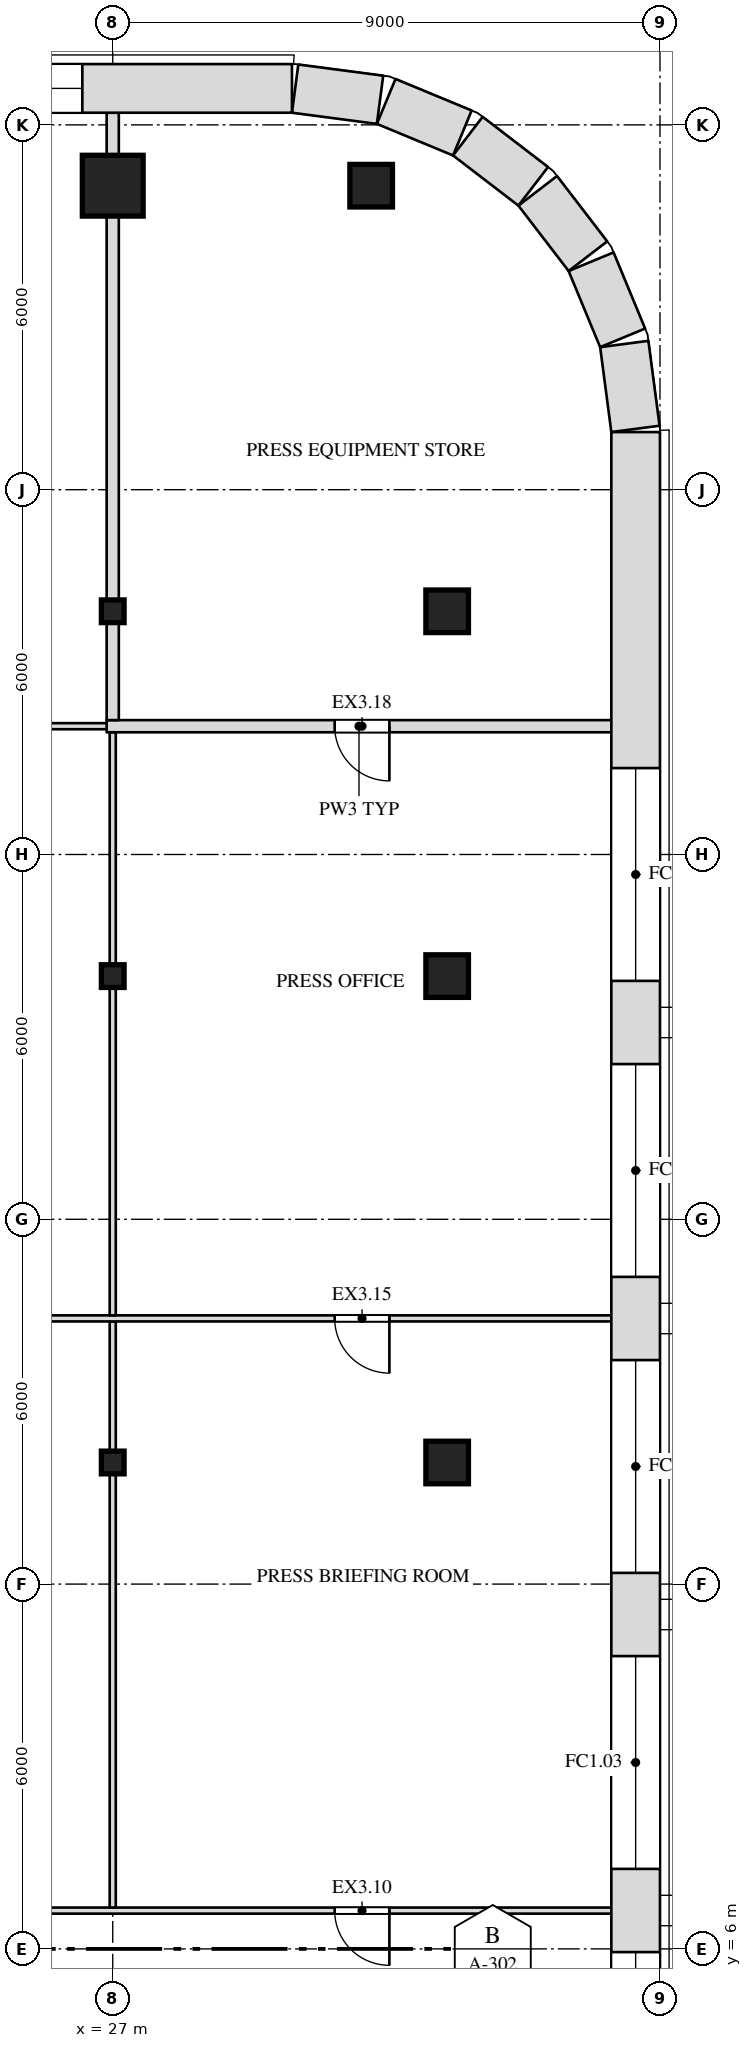
"""IFC4 building model, lengths in metres.
Left out: names, types, materials, properties, quantities, classifications, styles, units other than length and angle.
Written with IfcOpenShell. Run it as: python <this file> out.ifc"""

import sys

from ifc_helpers import new_model, si_unit, direction, frame, frame_2d, origin, origin_2d, place, context, subcontext, project, spatial, rectangle, i_section, extrude, element, fill, save


model = new_model("IFC4")
c1 = context("Model", 3, precision=1e-05, world=origin(), true_north=direction((0.0, 1.0)))
c2 = subcontext(c1, "Body", "Model", "MODEL_VIEW")
j1 = project(units=[si_unit("LENGTHUNIT", "METRE"), si_unit("PLANEANGLEUNIT", "RADIAN")], contexts=[c1])
p1 = place(None, origin())
s1 = spatial("IfcSite", under=j1, at=p1, CompositionType="ELEMENT")
p2 = place(p1, origin())
s2 = spatial("IfcBuilding", under=s1, at=p2, CompositionType="ELEMENT")
p3 = place(p2, frame((0.0, 0.0, 280.5)))
s3 = spatial("IfcBuildingStorey", under=s2, at=p3, CompositionType="ELEMENT", Elevation=280.5)
p4 = place(p3, frame((27.0, 14.0, 0.0), z_axis=(0.0, 0.0, 1.0), x_axis=(1.0, 0.0, 0.0)))
e1 = element("IfcColumn", 1, at=p4, inside=s3, PredefinedType="COLUMN", context=c2, shape_type="SweptSolid", body=[
    extrude(i_section(OverallWidth=0.373, OverallDepth=0.373, WebThickness=0.016, FlangeThickness=0.026, at=origin_2d()), origin(), (0.0, 0.0, 1.0), 4.0),
])
p5 = place(p3, frame((32.5, 14.0, 0.0), z_axis=(0.0, 0.0, 1.0), x_axis=(1.0, 0.0, 0.0)))
e2 = element("IfcColumn", 2, at=p5, inside=s3, PredefinedType="COLUMN", context=c2, shape_type="SweptSolid", body=[
    extrude(rectangle(XDim=0.7, YDim=0.7, at=origin_2d()), origin(), (0.0, 0.0, 1.0), 4.0),
])
p6 = place(p3, frame((27.0, 22.0, 0.0), z_axis=(0.0, 0.0, 1.0), x_axis=(1.0, 0.0, 0.0)))
e3 = element("IfcColumn", 3, at=p6, inside=s3, PredefinedType="COLUMN", context=c2, shape_type="SweptSolid", body=[
    extrude(i_section(OverallWidth=0.373, OverallDepth=0.373, WebThickness=0.016, FlangeThickness=0.026, at=origin_2d()), origin(), (0.0, 0.0, 1.0), 4.0),
])
p7 = place(p3, frame((32.5, 22.0, 0.0), z_axis=(0.0, 0.0, 1.0), x_axis=(1.0, 0.0, 0.0)))
e4 = element("IfcColumn", 4, at=p7, inside=s3, PredefinedType="COLUMN", context=c2, shape_type="SweptSolid", body=[
    extrude(rectangle(XDim=0.7, YDim=0.7, at=origin_2d()), origin(), (0.0, 0.0, 1.0), 4.0),
])
p8 = place(p3, frame((27.0, 28.0, 0.0), z_axis=(0.0, 0.0, 1.0), x_axis=(1.0, 0.0, 0.0)))
e5 = element("IfcColumn", 5, at=p8, inside=s3, PredefinedType="COLUMN", context=c2, shape_type="SweptSolid", body=[
    extrude(i_section(OverallWidth=0.373, OverallDepth=0.373, WebThickness=0.016, FlangeThickness=0.026, at=origin_2d()), origin(), (0.0, 0.0, 1.0), 4.0),
])
p9 = place(p3, frame((32.5, 28.0, 0.0), z_axis=(0.0, 0.0, 1.0), x_axis=(1.0, 0.0, 0.0)))
e6 = element("IfcColumn", 6, at=p9, inside=s3, PredefinedType="COLUMN", context=c2, shape_type="SweptSolid", body=[
    extrude(rectangle(XDim=0.7, YDim=0.7, at=origin_2d()), origin(), (0.0, 0.0, 1.0), 4.0),
])
p10 = place(p3, frame((27.0, 35.0, 0.0), z_axis=(0.0, 0.0, 1.0), x_axis=(1.0, 0.0, 0.0)))
e7 = element("IfcColumn", 7, at=p10, inside=s3, PredefinedType="COLUMN", context=c2, shape_type="SweptSolid", body=[
    extrude(rectangle(XDim=1.0, YDim=1.0, at=origin_2d()), origin(), (0.0, 0.0, 1.0), 4.0),
])
p11 = place(p3, frame((31.25, 35.0, 0.0), z_axis=(0.0, 0.0, 1.0), x_axis=(1.0, 0.0, 0.0)))
e8 = element("IfcColumn", 8, at=p11, inside=s3, PredefinedType="COLUMN", context=c2, shape_type="SweptSolid", body=[
    extrude(rectangle(XDim=0.7, YDim=0.7, at=origin_2d()), origin(), (0.0, 0.0, 1.0), 4.0),
])
p12 = place(p3, frame((15.05, 6.63, 0.0), z_axis=(0.0, 0.0, 1.0), x_axis=(1.0, 0.0, 0.0)))
e9 = element("IfcWall", 9, at=p12, inside=s3, PredefinedType="PARTITIONING", context=c2, shape_type="SweptSolid", body=[
    extrude(rectangle(XDim=20.15, YDim=0.1, at=frame_2d((10.075, 0.0))), origin(), (0.0, 0.0, 1.0), 3.78),
])
p13 = place(p12, frame((15.6, 0.0, 0.0)))
e10 = element("IfcOpeningElement", 10, at=p13, cuts=e9, PredefinedType="OPENING", context=c2, shape_type="SweptSolid", body=[
    extrude(rectangle(XDim=0.9, YDim=2.1, at=frame_2d((0.45, 1.05))), frame((0.0, 0.062, 0.0), z_axis=(0.0, -1.0, 0.0), x_axis=(1.0, 0.0, 0.0)), (0.0, 0.0, 1.0), 0.124),
])
p14 = place(p3, frame((27.0, 6.68, 0.0), z_axis=(0.0, 0.0, 1.0), x_axis=(0.0, 1.0, 0.0)))
e11 = element("IfcWall", 11, at=p14, inside=s3, PredefinedType="PARTITIONING", context=c2, shape_type="SweptSolid", body=[
    extrude(rectangle(XDim=7.133, YDim=0.1, at=frame_2d((3.567, 0.0))), origin(), (0.0, 0.0, 1.0), 2.848),
])
p15 = place(p3, frame((27.0, 14.187, 0.0), z_axis=(0.0, 0.0, 1.0), x_axis=(0.0, 1.0, 0.0)))
e12 = element("IfcWall", 12, at=p15, inside=s3, PredefinedType="PARTITIONING", context=c2, shape_type="SweptSolid", body=[
    extrude(rectangle(XDim=2.133, YDim=0.1, at=frame_2d((1.067, 0.0))), origin(), (0.0, 0.0, 1.0), 2.848),
])
p16 = place(p3, frame((15.05, 16.37, 0.0), z_axis=(0.0, 0.0, 1.0), x_axis=(1.0, 0.0, 0.0)))
e13 = element("IfcWall", 13, at=p16, inside=s3, PredefinedType="PARTITIONING", context=c2, shape_type="SweptSolid", body=[
    extrude(rectangle(XDim=20.15, YDim=0.1, at=frame_2d((10.075, 0.0))), origin(), (0.0, 0.0, 1.0), 3.78),
])
p17 = place(p16, frame((15.6, 0.0, 0.0)))
e14 = element("IfcOpeningElement", 14, at=p17, cuts=e13, PredefinedType="OPENING", context=c2, shape_type="SweptSolid", body=[
    extrude(rectangle(XDim=0.9, YDim=2.1, at=frame_2d((0.45, 1.05))), frame((0.0, 0.062, 0.0), z_axis=(0.0, -1.0, 0.0), x_axis=(1.0, 0.0, 0.0)), (0.0, 0.0, 1.0), 0.124),
])
p18 = place(p3, frame((27.0, 16.42, 0.0), z_axis=(0.0, 0.0, 1.0), x_axis=(0.0, 1.0, 0.0)))
e15 = element("IfcWall", 15, at=p18, inside=s3, PredefinedType="PARTITIONING", context=c2, shape_type="SweptSolid", body=[
    extrude(rectangle(XDim=5.393, YDim=0.1, at=frame_2d((2.697, 0.0))), origin(), (0.0, 0.0, 1.0), 2.848),
])
p19 = place(p3, frame((27.0, 22.187, 0.0), z_axis=(0.0, 0.0, 1.0), x_axis=(0.0, 1.0, 0.0)))
e16 = element("IfcWall", 16, at=p19, inside=s3, PredefinedType="PARTITIONING", context=c2, shape_type="SweptSolid", body=[
    extrude(rectangle(XDim=3.823, YDim=0.1, at=frame_2d((1.912, 0.0))), origin(), (0.0, 0.0, 1.0), 2.848),
])
p20 = place(p3, frame((15.05, 26.11, 0.0), z_axis=(0.0, 0.0, 1.0), x_axis=(1.0, 0.0, 0.0)))
e17 = element("IfcWall", 17, at=p20, inside=s3, PredefinedType="PARTITIONING", context=c2, shape_type="SweptSolid", body=[
    extrude(rectangle(XDim=12.05, YDim=0.1, at=frame_2d((6.025, 0.0))), origin(), (0.0, 0.0, 1.0), 3.78),
])
p21 = place(p3, frame((26.9, 26.11, 0.0), z_axis=(0.0, 0.0, 1.0), x_axis=(1.0, 0.0, 0.0)))
e18 = element("IfcWall", 18, at=p21, inside=s3, PredefinedType="PARTITIONING", context=c2, shape_type="SweptSolid", body=[
    extrude(rectangle(XDim=8.3, YDim=0.2, at=frame_2d((4.15, 0.0))), origin(), (0.0, 0.0, 1.0), 3.78),
])
p22 = place(p21, frame((3.75, 0.0, 0.0)))
e19 = element("IfcOpeningElement", 19, at=p22, cuts=e18, PredefinedType="OPENING", context=c2, shape_type="SweptSolid", body=[
    extrude(rectangle(XDim=0.9, YDim=2.1, at=frame_2d((0.45, 1.05))), frame((0.0, 0.112, 0.0), z_axis=(0.0, -1.0, 0.0), x_axis=(1.0, 0.0, 0.0)), (0.0, 0.0, 1.0), 0.224),
])
p23 = place(p3, frame((27.0, 26.21, 0.0), z_axis=(0.0, 0.0, 1.0), x_axis=(0.0, 1.0, 0.0)))
e20 = element("IfcWall", 20, at=p23, inside=s3, PredefinedType="PARTITIONING", context=c2, shape_type="SweptSolid", body=[
    extrude(rectangle(XDim=1.603, YDim=0.2, at=frame_2d((0.802, 0.0))), origin(), (0.0, 0.0, 1.0), 2.848),
])
p24 = place(p3, frame((27.0, 28.187, 0.0), z_axis=(0.0, 0.0, 1.0), x_axis=(0.0, 1.0, 0.0)))
e21 = element("IfcWall", 21, at=p24, inside=s3, PredefinedType="PARTITIONING", context=c2, shape_type="SweptSolid", body=[
    extrude(rectangle(XDim=6.313, YDim=0.2, at=frame_2d((3.157, 0.0))), origin(), (0.0, 0.0, 1.0), 2.848),
])
p25 = place(p3, frame((27.0, 35.5, 0.0), z_axis=(0.0, 0.0, 1.0), x_axis=(0.0, 1.0, 0.0)))
e22 = element("IfcWall", 22, at=p25, inside=s3, PredefinedType="PARTITIONING", context=c2, shape_type="SweptSolid", body=[
    extrude(rectangle(XDim=0.7, YDim=0.2, at=frame_2d((0.35, 0.0))), origin(), (0.0, 0.0, 1.0), 3.78),
])
p26 = place(p3, frame((35.6, -7.948, 0.0), z_axis=(0.0, 0.0, 1.0), x_axis=(0.0, 1.0, 0.0)))
e23 = element("IfcWall", 23, at=p26, inside=s3, PredefinedType="SOLIDWALL", context=c2, shape_type="SweptSolid", body=[
    extrude(rectangle(XDim=38.895, YDim=0.8, at=frame_2d((19.448, 0.0))), origin(), (0.0, 0.0, 1.0), 3.78),
])
p27 = place(p26, frame((5.526, 0.0, 1.0)))
e24 = element("IfcOpeningElement", 24, at=p27, cuts=e23, PredefinedType="OPENING", context=c2, shape_type="SweptSolid", body=[
    extrude(rectangle(XDim=3.5, YDim=2.5, at=frame_2d((1.75, 1.25))), frame((0.0, 0.412, 0.0), z_axis=(0.0, -1.0, 0.0), x_axis=(1.0, 0.0, 0.0)), (0.0, 0.0, 1.0), 0.824),
])
p28 = place(p26, frame((10.395, 0.0, 1.0)))
e25 = element("IfcOpeningElement", 25, at=p28, cuts=e23, PredefinedType="OPENING", context=c2, shape_type="SweptSolid", body=[
    extrude(rectangle(XDim=3.5, YDim=2.5, at=frame_2d((1.75, 1.25))), frame((0.0, 0.412, 0.0), z_axis=(0.0, -1.0, 0.0), x_axis=(1.0, 0.0, 0.0)), (0.0, 0.0, 1.0), 0.824),
])
p29 = place(p26, frame((15.263, 0.0, 1.0)))
e26 = element("IfcOpeningElement", 26, at=p29, cuts=e23, PredefinedType="OPENING", context=c2, shape_type="SweptSolid", body=[
    extrude(rectangle(XDim=3.5, YDim=2.5, at=frame_2d((1.75, 1.25))), frame((0.0, 0.412, 0.0), z_axis=(0.0, -1.0, 0.0), x_axis=(1.0, 0.0, 0.0)), (0.0, 0.0, 1.0), 0.824),
])
p30 = place(p26, frame((20.132, 0.0, 1.0)))
e27 = element("IfcOpeningElement", 27, at=p30, cuts=e23, PredefinedType="OPENING", context=c2, shape_type="SweptSolid", body=[
    extrude(rectangle(XDim=3.5, YDim=2.5, at=frame_2d((1.75, 1.25))), frame((0.0, 0.412, 0.0), z_axis=(0.0, -1.0, 0.0), x_axis=(1.0, 0.0, 0.0)), (0.0, 0.0, 1.0), 0.824),
])
p31 = place(p26, frame((25.0, 0.0, 1.0)))
e28 = element("IfcOpeningElement", 28, at=p31, cuts=e23, PredefinedType="OPENING", context=c2, shape_type="SweptSolid", body=[
    extrude(rectangle(XDim=3.5, YDim=2.5, at=frame_2d((1.75, 1.25))), frame((0.0, 0.412, 0.0), z_axis=(0.0, -1.0, 0.0), x_axis=(1.0, 0.0, 0.0)), (0.0, 0.0, 1.0), 0.824),
])
p32 = place(p26, frame((29.869, 0.0, 1.0)))
e29 = element("IfcOpeningElement", 29, at=p32, cuts=e23, PredefinedType="OPENING", context=c2, shape_type="SweptSolid", body=[
    extrude(rectangle(XDim=3.5, YDim=2.5, at=frame_2d((1.75, 1.25))), frame((0.0, 0.412, 0.0), z_axis=(0.0, -1.0, 0.0), x_axis=(1.0, 0.0, 0.0)), (0.0, 0.0, 1.0), 0.824),
])
p33 = place(p3, frame((35.597, 31.0, 0.0), z_axis=(0.0, 0.0, 1.0), x_axis=(-0.130517283865, 0.99144603414, 0.0)))
e30 = element("IfcWall", 30, at=p33, inside=s3, PredefinedType="SOLIDWALL", context=c2, shape_type="SweptSolid", body=[
    extrude(rectangle(XDim=1.408, YDim=0.8, at=frame_2d((0.704, 0.0))), origin(), (0.0, 0.0, 1.0), 3.78),
])
p34 = place(p3, frame((35.386, 32.497, 0.0), z_axis=(0.0, 0.0, 1.0), x_axis=(-0.38276009378, 0.923847774587, 0.0)))
e31 = element("IfcWall", 31, at=p34, inside=s3, PredefinedType="SOLIDWALL", context=c2, shape_type="SweptSolid", body=[
    extrude(rectangle(XDim=1.355, YDim=0.8, at=frame_2d((0.678, 0.0))), origin(), (0.0, 0.0, 1.0), 3.78),
])
for number, where, z_axis, x_axis in (
    (32, (34.815, 33.84, 0.0), (0.0, 0.0, 1.0), (-0.609, 0.793, 0.0)),
    (33, (33.916, 34.989, 0.0), (0.0, 0.0, 1.0), (-0.793, 0.609, 0.0)),
):
    element("IfcWall", number, at=place(p3, frame(where, z_axis=z_axis, x_axis=x_axis)), inside=s3, PredefinedType="SOLIDWALL", context=c2, shape_type="SweptSolid", body=[
        extrude(rectangle(XDim=1.356, YDim=0.8, at=frame_2d((0.678, 0.0))), origin(), (0.0, 0.0, 1.0), 3.78),
    ])
p35 = place(p3, frame((32.75, 35.867, 0.0), z_axis=(0.0, 0.0, 1.0), x_axis=(-0.923847774587, 0.38276009378, 0.0)))
e34 = element("IfcWall", 34, at=p35, inside=s3, PredefinedType="SOLIDWALL", context=c2, shape_type="SweptSolid", body=[
    extrude(rectangle(XDim=1.355, YDim=0.8, at=frame_2d((0.678, 0.0))), origin(), (0.0, 0.0, 1.0), 3.78),
])
p36 = place(p3, frame((31.396, 36.413, 0.0), z_axis=(0.0, 0.0, 1.0), x_axis=(-0.99144603414, 0.130517283865, 0.0)))
e35 = element("IfcWall", 35, at=p36, inside=s3, PredefinedType="SOLIDWALL", context=c2, shape_type="SweptSolid", body=[
    extrude(rectangle(XDim=1.408, YDim=0.8, at=frame_2d((0.704, 0.0))), origin(), (0.0, 0.0, 1.0), 3.78),
])
p37 = place(p3, frame((29.948, 36.6, 0.0), z_axis=(0.0, 0.0, 1.0), x_axis=(-1.0, 0.0, 0.0)))
e36 = element("IfcWall", 36, at=p37, inside=s3, PredefinedType="SOLIDWALL", context=c2, shape_type="SweptSolid", body=[
    extrude(rectangle(XDim=59.895, YDim=0.8, at=frame_2d((29.948, 0.0))), origin(), (0.0, 0.0, 1.0), 3.78),
])
p38 = place(p37, frame((3.448, 0.0, 1.0)))
e37 = element("IfcOpeningElement", 37, at=p38, cuts=e36, PredefinedType="OPENING", context=c2, shape_type="SweptSolid", body=[
    extrude(rectangle(XDim=3.5, YDim=2.5, at=frame_2d((1.75, 1.25))), frame((0.0, 0.412, 0.0), z_axis=(0.0, -1.0, 0.0), x_axis=(1.0, 0.0, 0.0)), (0.0, 0.0, 1.0), 0.824),
])
p39 = place(p37, frame((7.948, 0.0, 1.0)))
e38 = element("IfcOpeningElement", 38, at=p39, cuts=e36, PredefinedType="OPENING", context=c2, shape_type="SweptSolid", body=[
    extrude(rectangle(XDim=3.5, YDim=2.5, at=frame_2d((1.75, 1.25))), frame((0.0, 0.412, 0.0), z_axis=(0.0, -1.0, 0.0), x_axis=(1.0, 0.0, 0.0)), (0.0, 0.0, 1.0), 0.824),
])
p40 = place(p37, frame((12.448, 0.0, 1.0)))
e39 = element("IfcOpeningElement", 39, at=p40, cuts=e36, PredefinedType="OPENING", context=c2, shape_type="SweptSolid", body=[
    extrude(rectangle(XDim=3.5, YDim=2.5, at=frame_2d((1.75, 1.25))), frame((0.0, 0.412, 0.0), z_axis=(0.0, -1.0, 0.0), x_axis=(1.0, 0.0, 0.0)), (0.0, 0.0, 1.0), 0.824),
])
p41 = place(p37, frame((16.948, 0.0, 1.0)))
e40 = element("IfcOpeningElement", 40, at=p41, cuts=e36, PredefinedType="OPENING", context=c2, shape_type="SweptSolid", body=[
    extrude(rectangle(XDim=3.5, YDim=2.5, at=frame_2d((1.75, 1.25))), frame((0.0, 0.412, 0.0), z_axis=(0.0, -1.0, 0.0), x_axis=(1.0, 0.0, 0.0)), (0.0, 0.0, 1.0), 0.824),
])
p42 = place(p37, frame((21.448, 0.0, 1.0)))
e41 = element("IfcOpeningElement", 41, at=p42, cuts=e36, PredefinedType="OPENING", context=c2, shape_type="SweptSolid", body=[
    extrude(rectangle(XDim=3.5, YDim=2.5, at=frame_2d((1.75, 1.25))), frame((0.0, 0.412, 0.0), z_axis=(0.0, -1.0, 0.0), x_axis=(1.0, 0.0, 0.0)), (0.0, 0.0, 1.0), 0.824),
])
p43 = place(p37, frame((25.948, 0.0, 1.0)))
e42 = element("IfcOpeningElement", 42, at=p43, cuts=e36, PredefinedType="OPENING", context=c2, shape_type="SweptSolid", body=[
    extrude(rectangle(XDim=3.5, YDim=2.5, at=frame_2d((1.75, 1.25))), frame((0.0, 0.412, 0.0), z_axis=(0.0, -1.0, 0.0), x_axis=(1.0, 0.0, 0.0)), (0.0, 0.0, 1.0), 0.824),
])
p44 = place(p37, frame((30.448, 0.0, 1.0)))
e43 = element("IfcOpeningElement", 43, at=p44, cuts=e36, PredefinedType="OPENING", context=c2, shape_type="SweptSolid", body=[
    extrude(rectangle(XDim=3.5, YDim=2.5, at=frame_2d((1.75, 1.25))), frame((0.0, 0.412, 0.0), z_axis=(0.0, -1.0, 0.0), x_axis=(1.0, 0.0, 0.0)), (0.0, 0.0, 1.0), 0.824),
])
p45 = place(p37, frame((34.948, 0.0, 1.0)))
e44 = element("IfcOpeningElement", 44, at=p45, cuts=e36, PredefinedType="OPENING", context=c2, shape_type="SweptSolid", body=[
    extrude(rectangle(XDim=3.5, YDim=2.5, at=frame_2d((1.75, 1.25))), frame((0.0, 0.412, 0.0), z_axis=(0.0, -1.0, 0.0), x_axis=(1.0, 0.0, 0.0)), (0.0, 0.0, 1.0), 0.824),
])
p46 = place(p37, frame((39.448, 0.0, 1.0)))
e45 = element("IfcOpeningElement", 45, at=p46, cuts=e36, PredefinedType="OPENING", context=c2, shape_type="SweptSolid", body=[
    extrude(rectangle(XDim=3.5, YDim=2.5, at=frame_2d((1.75, 1.25))), frame((0.0, 0.412, 0.0), z_axis=(0.0, -1.0, 0.0), x_axis=(1.0, 0.0, 0.0)), (0.0, 0.0, 1.0), 0.824),
])
p47 = place(p37, frame((43.948, 0.0, 1.0)))
e46 = element("IfcOpeningElement", 46, at=p47, cuts=e36, PredefinedType="OPENING", context=c2, shape_type="SweptSolid", body=[
    extrude(rectangle(XDim=3.5, YDim=2.5, at=frame_2d((1.75, 1.25))), frame((0.0, 0.412, 0.0), z_axis=(0.0, -1.0, 0.0), x_axis=(1.0, 0.0, 0.0)), (0.0, 0.0, 1.0), 0.824),
])
p48 = place(p37, frame((48.448, 0.0, 1.0)))
e47 = element("IfcOpeningElement", 47, at=p48, cuts=e36, PredefinedType="OPENING", context=c2, shape_type="SweptSolid", body=[
    extrude(rectangle(XDim=3.5, YDim=2.5, at=frame_2d((1.75, 1.25))), frame((0.0, 0.412, 0.0), z_axis=(0.0, -1.0, 0.0), x_axis=(1.0, 0.0, 0.0)), (0.0, 0.0, 1.0), 0.824),
])
p49 = place(p37, frame((52.948, 0.0, 1.0)))
e48 = element("IfcOpeningElement", 48, at=p49, cuts=e36, PredefinedType="OPENING", context=c2, shape_type="SweptSolid", body=[
    extrude(rectangle(XDim=3.5, YDim=2.5, at=frame_2d((1.75, 1.25))), frame((0.0, 0.412, 0.0), z_axis=(0.0, -1.0, 0.0), x_axis=(1.0, 0.0, 0.0)), (0.0, 0.0, 1.0), 0.824),
])
p50 = place(p13, origin())
e49 = element("IfcDoor", 49, at=p50, inside=s3, OperationType="SINGLE_SWING_LEFT", PredefinedType="DOOR", context=c2, shape_type="SweptSolid", body=[
    extrude(rectangle(XDim=0.9, YDim=2.1, at=frame_2d((0.45, 1.05))), frame((0.0, 0.025, 0.0), z_axis=(0.0, -1.0, 0.0), x_axis=(1.0, 0.0, 0.0)), (0.0, 0.0, 1.0), 0.05),
])
fill(e10, e49)
p51 = place(p17, origin())
e50 = element("IfcDoor", 50, at=p51, inside=s3, OperationType="SINGLE_SWING_LEFT", PredefinedType="DOOR", context=c2, shape_type="SweptSolid", body=[
    extrude(rectangle(XDim=0.9, YDim=2.1, at=frame_2d((0.45, 1.05))), frame((0.0, 0.025, 0.0), z_axis=(0.0, -1.0, 0.0), x_axis=(1.0, 0.0, 0.0)), (0.0, 0.0, 1.0), 0.05),
])
fill(e14, e50)
p52 = place(p22, origin())
e51 = element("IfcDoor", 51, at=p52, inside=s3, OperationType="SINGLE_SWING_LEFT", PredefinedType="DOOR", context=c2, shape_type="SweptSolid", body=[
    extrude(rectangle(XDim=0.9, YDim=2.1, at=frame_2d((0.45, 1.05))), frame((0.0, 0.025, 0.0), z_axis=(0.0, -1.0, 0.0), x_axis=(1.0, 0.0, 0.0)), (0.0, 0.0, 1.0), 0.05),
])
fill(e19, e51)
p53 = place(p28, origin())
e52 = element("IfcWindow", 52, at=p53, inside=s3, PartitioningType="SINGLE_PANEL", PredefinedType="WINDOW", context=c2, shape_type="SweptSolid", body=[
    extrude(rectangle(XDim=3.5, YDim=2.5, at=frame_2d((1.75, 1.25))), frame((0.0, 0.03, 0.0), z_axis=(0.0, -1.0, 0.0), x_axis=(1.0, 0.0, 0.0)), (0.0, 0.0, 1.0), 0.06),
])
fill(e25, e52)
p54 = place(p29, origin())
e53 = element("IfcWindow", 53, at=p54, inside=s3, PartitioningType="SINGLE_PANEL", PredefinedType="WINDOW", context=c2, shape_type="SweptSolid", body=[
    extrude(rectangle(XDim=3.5, YDim=2.5, at=frame_2d((1.75, 1.25))), frame((0.0, 0.03, 0.0), z_axis=(0.0, -1.0, 0.0), x_axis=(1.0, 0.0, 0.0)), (0.0, 0.0, 1.0), 0.06),
])
fill(e26, e53)
p55 = place(p30, origin())
e54 = element("IfcWindow", 54, at=p55, inside=s3, PartitioningType="SINGLE_PANEL", PredefinedType="WINDOW", context=c2, shape_type="SweptSolid", body=[
    extrude(rectangle(XDim=3.5, YDim=2.5, at=frame_2d((1.75, 1.25))), frame((0.0, 0.03, 0.0), z_axis=(0.0, -1.0, 0.0), x_axis=(1.0, 0.0, 0.0)), (0.0, 0.0, 1.0), 0.06),
])
fill(e27, e54)
p56 = place(p31, origin())
e55 = element("IfcWindow", 55, at=p56, inside=s3, PartitioningType="SINGLE_PANEL", PredefinedType="WINDOW", context=c2, shape_type="SweptSolid", body=[
    extrude(rectangle(XDim=3.5, YDim=2.5, at=frame_2d((1.75, 1.25))), frame((0.0, 0.03, 0.0), z_axis=(0.0, -1.0, 0.0), x_axis=(1.0, 0.0, 0.0)), (0.0, 0.0, 1.0), 0.06),
])
fill(e28, e55)
p57 = place(p32, origin())
e56 = element("IfcWindow", 56, at=p57, inside=s3, PartitioningType="SINGLE_PANEL", PredefinedType="WINDOW", context=c2, shape_type="SweptSolid", body=[
    extrude(rectangle(XDim=3.5, YDim=2.5, at=frame_2d((1.75, 1.25))), frame((0.0, 0.03, 0.0), z_axis=(0.0, -1.0, 0.0), x_axis=(1.0, 0.0, 0.0)), (0.0, 0.0, 1.0), 0.06),
])
fill(e29, e56)
p58 = place(p38, origin())
e57 = element("IfcWindow", 57, at=p58, inside=s3, PartitioningType="SINGLE_PANEL", PredefinedType="WINDOW", context=c2, shape_type="SweptSolid", body=[
    extrude(rectangle(XDim=3.5, YDim=2.5, at=frame_2d((1.75, 1.25))), frame((0.0, 0.03, 0.0), z_axis=(0.0, -1.0, 0.0), x_axis=(1.0, 0.0, 0.0)), (0.0, 0.0, 1.0), 0.06),
])
fill(e37, e57)
save(model, sys.argv[1])
